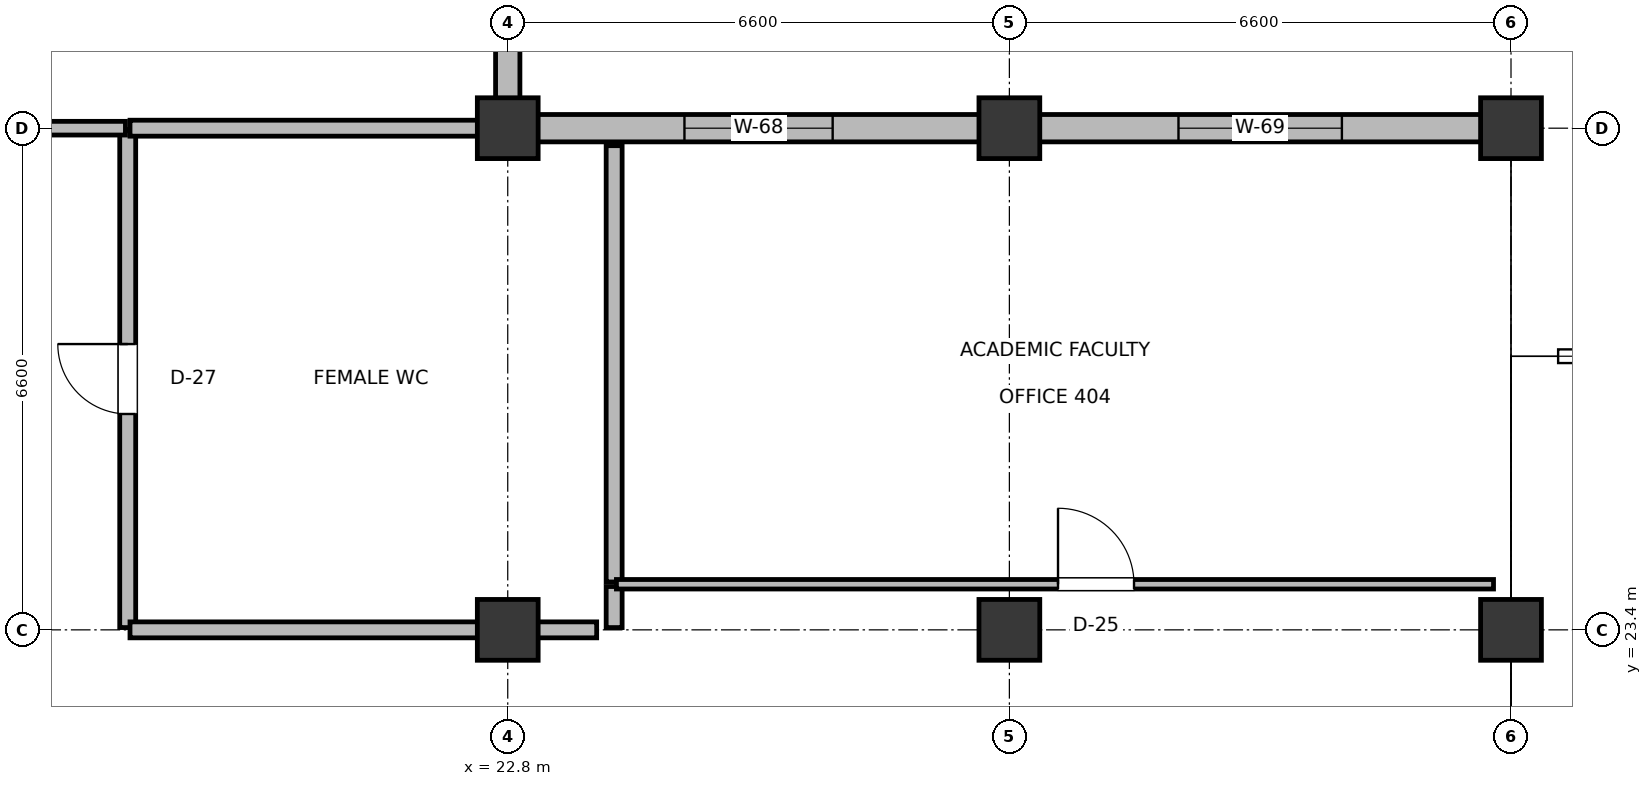
"""IFC4 building model, lengths in metres.
Left out: names, types, materials, properties, quantities, classifications, styles, units other than length and angle.
Written with IfcOpenShell. Run it as: python <this file> out.ifc"""

import sys

from ifc_helpers import new_model, si_unit, direction, frame, frame_2d, origin, origin_2d, place, context, subcontext, project, spatial, rectangle, extrude, element, fill, save


model = new_model("IFC4")
c1 = context("Model", 3, precision=1e-05, world=origin(), true_north=direction((0.0, 1.0)))
c2 = subcontext(c1, "Body", "Model", "MODEL_VIEW")
j1 = project(units=[si_unit("LENGTHUNIT", "METRE"), si_unit("PLANEANGLEUNIT", "RADIAN")], contexts=[c1])
p1 = place(None, origin())
s1 = spatial("IfcSite", under=j1, at=p1, CompositionType="ELEMENT")
p2 = place(p1, origin())
s2 = spatial("IfcBuilding", under=s1, at=p2, CompositionType="ELEMENT")
p3 = place(p2, frame((0.0, 0.0, 19.5)))
s3 = spatial("IfcBuildingStorey", under=s2, at=p3, CompositionType="ELEMENT", Elevation=19.5)
for number, where, z_axis, x_axis in (
    (1, (22.8, 23.4, 0.0), (0.0, 0.0, 1.0), (1.0, 0.0, 0.0)),
    (2, (22.8, 30.0, 0.0), (0.0, 0.0, 1.0), (1.0, 0.0, 0.0)),
    (3, (29.4, 23.4, 0.0), (0.0, 0.0, 1.0), (1.0, 0.0, 0.0)),
    (4, (29.4, 30.0, 0.0), (0.0, 0.0, 1.0), (1.0, 0.0, 0.0)),
    (5, (36.0, 23.4, 0.0), (0.0, 0.0, 1.0), (1.0, 0.0, 0.0)),
    (6, (36.0, 30.0, 0.0), (0.0, 0.0, 1.0), (1.0, 0.0, 0.0)),
):
    element("IfcColumn", number, at=place(p3, frame(where, z_axis=z_axis, x_axis=x_axis)), inside=s3, PredefinedType="COLUMN", context=c2, shape_type="SweptSolid", body=[
        extrude(rectangle(XDim=0.8, YDim=0.8, at=origin_2d()), origin(), (0.0, 0.0, 1.0), 4.5),
    ])
p4 = place(p3, frame((23.185, 30.0, 0.0), z_axis=(0.0, 0.0, 1.0), x_axis=(1.0, 0.0, 0.0)))
e7 = element("IfcWall", 7, at=p4, inside=s3, PredefinedType="SOLIDWALL", context=c2, shape_type="SweptSolid", body=[
    extrude(rectangle(XDim=5.83, YDim=0.36, at=frame_2d((2.915, 0.0))), origin(), (0.0, 0.0, 1.0), 3.525),
])
p5 = place(p4, frame((1.94, 0.0, 0.9)))
e8 = element("IfcOpeningElement", 8, at=p5, cuts=e7, PredefinedType="OPENING", context=c2, shape_type="SweptSolid", body=[
    extrude(rectangle(XDim=1.95, YDim=1.75, at=frame_2d((0.975, 0.875))), frame((0.0, 0.19, 0.0), z_axis=(0.0, -1.0, 0.0), x_axis=(1.0, 0.0, 0.0)), (0.0, 0.0, 1.0), 0.38),
])
p6 = place(p3, frame((29.785, 30.0, 0.0), z_axis=(0.0, 0.0, 1.0), x_axis=(1.0, 0.0, 0.0)))
e9 = element("IfcWall", 9, at=p6, inside=s3, PredefinedType="SOLIDWALL", context=c2, shape_type="SweptSolid", body=[
    extrude(rectangle(XDim=5.83, YDim=0.36, at=frame_2d((2.915, 0.0))), origin(), (0.0, 0.0, 1.0), 3.595),
])
p7 = place(p6, frame((1.84, 0.0, 0.9)))
e10 = element("IfcOpeningElement", 10, at=p7, cuts=e9, PredefinedType="OPENING", context=c2, shape_type="SweptSolid", body=[
    extrude(rectangle(XDim=2.15, YDim=1.15, at=frame_2d((1.075, 0.575))), frame((0.0, 0.19, 0.0), z_axis=(0.0, -1.0, 0.0), x_axis=(1.0, 0.0, 0.0)), (0.0, 0.0, 1.0), 0.38),
])
p8 = place(p3, frame((22.8, 30.385, 0.0), z_axis=(0.0, 0.0, 1.0), x_axis=(0.0, 1.0, 0.0)))
e11 = element("IfcWall", 11, at=p8, inside=s3, PredefinedType="SOLIDWALL", context=c2, shape_type="SweptSolid", body=[
    extrude(rectangle(XDim=8.23, YDim=0.32, at=frame_2d((4.115, 0.0))), origin(), (0.0, 0.0, 1.0), 3.525),
])
p9 = place(p8, frame((2.94, 0.0, 0.9)))
e12 = element("IfcOpeningElement", 12, at=p9, cuts=e11, PredefinedType="OPENING", context=c2, shape_type="SweptSolid", body=[
    extrude(rectangle(XDim=2.35, YDim=1.9, at=frame_2d((1.175, 0.95))), frame((0.0, 0.17, 0.0), z_axis=(0.0, -1.0, 0.0), x_axis=(1.0, 0.0, 0.0)), (0.0, 0.0, 1.0), 0.34),
])
p10 = place(p3, frame((24.2, 24.03, 0.0), z_axis=(0.0, 0.0, 1.0), x_axis=(0.0, 1.0, 0.0)))
e13 = element("IfcWall", 13, at=p10, inside=s3, PredefinedType="PLUMBINGWALL", context=c2, shape_type="SweptSolid", body=[
    extrude(rectangle(XDim=5.74, YDim=0.21, at=frame_2d((2.87, 0.0))), origin(), (0.0, 0.0, 1.0), 3.525),
])
p11 = place(p3, frame((24.2, 23.43, 0.0), z_axis=(0.0, 0.0, 1.0), x_axis=(0.0, 1.0, 0.0)))
e14 = element("IfcWall", 14, at=p11, inside=s3, PredefinedType="PLUMBINGWALL", context=c2, shape_type="SweptSolid", body=[
    extrude(rectangle(XDim=0.54, YDim=0.21, at=frame_2d((0.27, 0.0))), origin(), (0.0, 0.0, 1.0), 3.525),
])
p12 = place(p3, frame((17.8, 23.43, 0.0), z_axis=(0.0, 0.0, 1.0), x_axis=(0.0, 1.0, 0.0)))
e15 = element("IfcWall", 15, at=p12, inside=s3, PredefinedType="PLUMBINGWALL", context=c2, shape_type="SweptSolid", body=[
    extrude(rectangle(XDim=6.54, YDim=0.21, at=frame_2d((3.27, 0.0))), origin(), (0.0, 0.0, 1.0), 3.295),
])
p13 = place(p12, frame((2.81, 0.0, 0.0)))
e16 = element("IfcOpeningElement", 16, at=p13, cuts=e15, PredefinedType="OPENING", context=c2, shape_type="SweptSolid", body=[
    extrude(rectangle(XDim=0.92, YDim=2.1, at=frame_2d((0.46, 1.05))), frame((0.0, 0.115, 0.0), z_axis=(0.0, -1.0, 0.0), x_axis=(1.0, 0.0, 0.0)), (0.0, 0.0, 1.0), 0.23),
])
p14 = place(p3, frame((17.83, 23.4, 0.0), z_axis=(0.0, 0.0, 1.0), x_axis=(1.0, 0.0, 0.0)))
e17 = element("IfcWall", 17, at=p14, inside=s3, PredefinedType="PLUMBINGWALL", context=c2, shape_type="SweptSolid", body=[
    extrude(rectangle(XDim=6.14, YDim=0.21, at=frame_2d((3.07, 0.0))), origin(), (0.0, 0.0, 1.0), 3.295),
])
p15 = place(p3, frame((17.83, 30.0, 0.0), z_axis=(0.0, 0.0, 1.0), x_axis=(1.0, 0.0, 0.0)))
e18 = element("IfcWall", 18, at=p15, inside=s3, PredefinedType="PLUMBINGWALL", context=c2, shape_type="SweptSolid", body=[
    extrude(rectangle(XDim=4.74, YDim=0.21, at=frame_2d((2.37, 0.0))), origin(), (0.0, 0.0, 1.0), 3.595),
])
p16 = place(p3, frame((24.23, 24.0, 0.0), z_axis=(0.0, 0.0, 1.0), x_axis=(1.0, 0.0, 0.0)))
e19 = element("IfcWall", 19, at=p16, inside=s3, PredefinedType="PARTITIONING", context=c2, shape_type="SweptSolid", body=[
    extrude(rectangle(XDim=11.54, YDim=0.125, at=frame_2d((5.77, 0.0))), origin(), (0.0, 0.0, 1.0), 3.595),
])
p17 = place(p16, frame((5.81, 0.0, 0.0)))
e20 = element("IfcOpeningElement", 20, at=p17, cuts=e19, PredefinedType="OPENING", context=c2, shape_type="SweptSolid", body=[
    extrude(rectangle(XDim=1.0, YDim=2.15, at=frame_2d((0.5, 1.075))), frame((0.0, 0.073, 0.0), z_axis=(0.0, -1.0, 0.0), x_axis=(1.0, 0.0, 0.0)), (0.0, 0.0, 1.0), 0.145),
])
p18 = place(p3, frame((13.43, 30.0, 0.0), z_axis=(0.0, 0.0, 1.0), x_axis=(1.0, 0.0, 0.0)))
e21 = element("IfcWall", 21, at=p18, inside=s3, PredefinedType="PARTITIONING", context=c2, shape_type="SweptSolid", body=[
    extrude(rectangle(XDim=4.34, YDim=0.18, at=frame_2d((2.17, 0.0))), origin(), (0.0, 0.0, 1.0), 3.425),
])
p19 = place(p18, frame((1.105, 0.0, 0.0)))
e22 = element("IfcOpeningElement", 22, at=p19, cuts=e21, PredefinedType="OPENING", context=c2, shape_type="SweptSolid", body=[
    extrude(rectangle(XDim=1.05, YDim=2.2, at=frame_2d((0.525, 1.1))), frame((0.0, 0.1, 0.0), z_axis=(0.0, -1.0, 0.0), x_axis=(1.0, 0.0, 0.0)), (0.0, 0.0, 1.0), 0.2),
])
p20 = place(p5, origin())
e23 = element("IfcWindow", 23, at=p20, inside=s3, PartitioningType="DOUBLE_PANEL_VERTICAL", PredefinedType="WINDOW", context=c2, shape_type="SweptSolid", body=[
    extrude(rectangle(XDim=1.95, YDim=1.75, at=frame_2d((0.975, 0.875))), frame((0.0, 0.03, 0.0), z_axis=(0.0, -1.0, 0.0), x_axis=(1.0, 0.0, 0.0)), (0.0, 0.0, 1.0), 0.06),
])
fill(e8, e23)
p21 = place(p7, origin())
e24 = element("IfcWindow", 24, at=p21, inside=s3, PartitioningType="DOUBLE_PANEL_VERTICAL", PredefinedType="WINDOW", context=c2, shape_type="SweptSolid", body=[
    extrude(rectangle(XDim=2.15, YDim=1.15, at=frame_2d((1.075, 0.575))), frame((0.0, 0.03, 0.0), z_axis=(0.0, -1.0, 0.0), x_axis=(1.0, 0.0, 0.0)), (0.0, 0.0, 1.0), 0.06),
])
fill(e10, e24)
p22 = place(p13, origin())
e25 = element("IfcDoor", 25, at=p22, inside=s3, OperationType="SINGLE_SWING_RIGHT", PredefinedType="DOOR", context=c2, shape_type="SweptSolid", body=[
    extrude(rectangle(XDim=0.92, YDim=2.1, at=frame_2d((0.46, 1.05))), frame((0.0, 0.025, 0.0), z_axis=(0.0, -1.0, 0.0), x_axis=(1.0, 0.0, 0.0)), (0.0, 0.0, 1.0), 0.05),
])
fill(e16, e25)
p23 = place(p17, origin())
e26 = element("IfcDoor", 26, at=p23, inside=s3, OperationType="SINGLE_SWING_LEFT", PredefinedType="DOOR", context=c2, shape_type="SweptSolid", body=[
    extrude(rectangle(XDim=1.0, YDim=2.15, at=frame_2d((0.5, 1.075))), frame((0.0, 0.025, 0.0), z_axis=(0.0, -1.0, 0.0), x_axis=(1.0, 0.0, 0.0)), (0.0, 0.0, 1.0), 0.05),
])
fill(e20, e26)
save(model, sys.argv[1])
